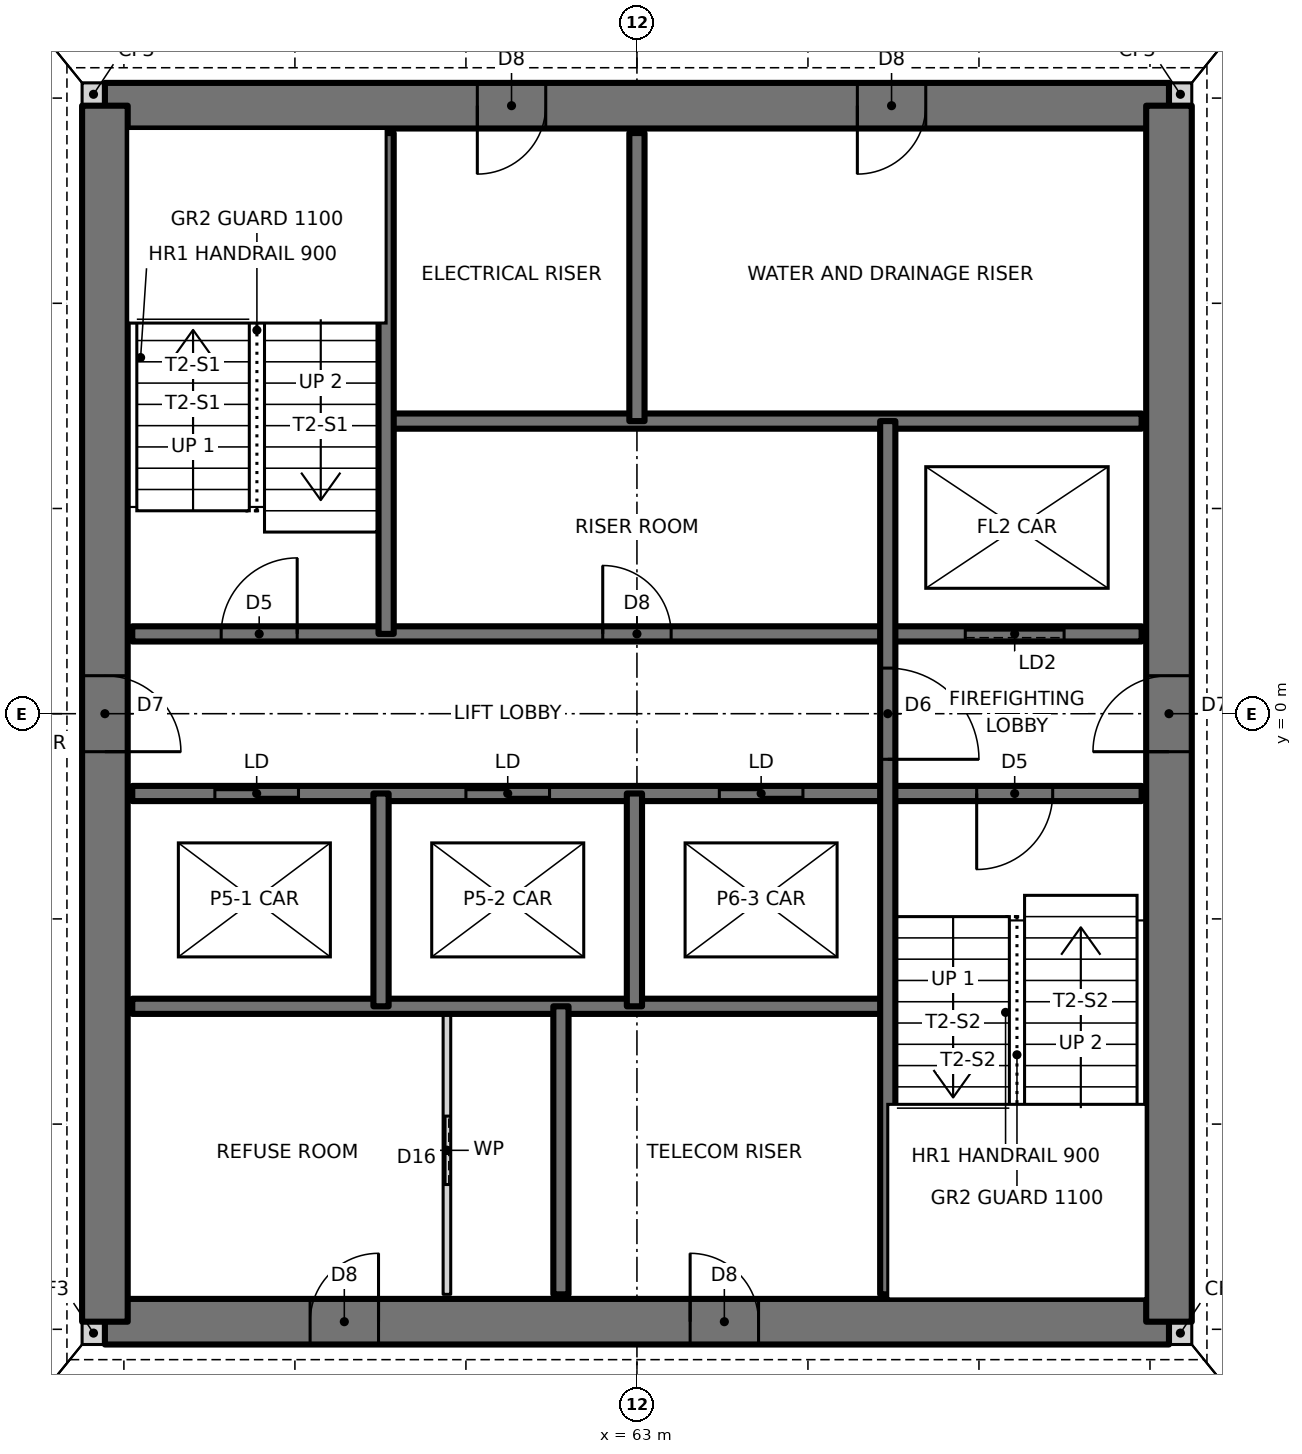
"""IFC4 building model, lengths in metres.
Left out: names, types, materials, properties, quantities, classifications, styles, units other than length and angle.
Written with IfcOpenShell. Run it as: python <this file> out.ifc"""

import sys

from ifc_helpers import new_model, si_unit, direction, frame, frame_2d, origin, place, context, subcontext, project, spatial, rectangle, extrude, element, fill, save


model = new_model("IFC4")
c1 = context("Model", 3, precision=1e-05, world=origin(), true_north=direction((0.0, 1.0)))
c2 = subcontext(c1, "Body", "Model", "MODEL_VIEW")
j1 = project(units=[si_unit("LENGTHUNIT", "METRE"), si_unit("PLANEANGLEUNIT", "RADIAN")], contexts=[c1])
p1 = place(None, origin())
s1 = spatial("IfcSite", under=j1, at=p1, CompositionType="ELEMENT")
p2 = place(p1, origin())
s2 = spatial("IfcBuilding", under=s1, at=p2, CompositionType="ELEMENT")
p3 = place(p2, frame((0.0, 0.0, 98.0)))
s3 = spatial("IfcBuildingStorey", under=s2, at=p3, CompositionType="ELEMENT", Elevation=98.0)
for number, where, z_axis, x_axis in (
    (1, (55.7, -8.15, 0.0), (0.0, 0.0, 1.0), (1.0, 0.0, 0.0)),
    (2, (70.0, -8.15, 0.0), (0.0, 0.0, 1.0), (1.0, 0.0, 0.0)),
    (3, (70.0, 8.15, 0.0), (0.0, 0.0, 1.0), (1.0, 0.0, 0.0)),
    (4, (55.7, 8.15, 0.0), (0.0, 0.0, 1.0), (1.0, 0.0, 0.0)),
):
    element("IfcWall", number, at=place(p3, frame(where, z_axis=z_axis, x_axis=x_axis)), inside=s3, PredefinedType="SOLIDWALL", context=c2, shape_type="SweptSolid", body=[
        extrude(rectangle(XDim=0.3, YDim=0.3, at=frame_2d((0.15, 0.0))), origin(), (0.0, 0.0, 1.0), 3.5),
    ])
p4 = place(p3, frame((56.0, -8.0, 0.0), z_axis=(0.0, 0.0, 1.0), x_axis=(1.0, 0.0, 0.0)))
e5 = element("IfcWall", 5, at=p4, inside=s3, PredefinedType="SHEAR", context=c2, shape_type="SweptSolid", body=[
    extrude(rectangle(XDim=14.0, YDim=0.6, at=frame_2d((7.0, 0.0))), origin(), (0.0, 0.0, 1.0), 3.5),
])
p5 = place(p4, frame((2.7, 0.0, 0.0)))
e6 = element("IfcOpeningElement", 6, at=p5, cuts=e5, PredefinedType="OPENING", context=c2, shape_type="SweptSolid", body=[
    extrude(rectangle(XDim=0.9, YDim=2.1, at=frame_2d((0.45, 1.05))), frame((0.0, 0.31, 0.0), z_axis=(0.0, -1.0, 0.0), x_axis=(1.0, 0.0, 0.0)), (0.0, 0.0, 1.0), 0.62),
])
p6 = place(p4, frame((7.7, 0.0, 0.0)))
e7 = element("IfcOpeningElement", 7, at=p6, cuts=e5, PredefinedType="OPENING", context=c2, shape_type="SweptSolid", body=[
    extrude(rectangle(XDim=0.9, YDim=2.1, at=frame_2d((0.45, 1.05))), frame((0.0, 0.31, 0.0), z_axis=(0.0, -1.0, 0.0), x_axis=(1.0, 0.0, 0.0)), (0.0, 0.0, 1.0), 0.62),
])
p7 = place(p3, frame((70.0, 8.0, 0.0), z_axis=(0.0, 0.0, 1.0), x_axis=(-1.0, 0.0, 0.0)))
e8 = element("IfcWall", 8, at=p7, inside=s3, PredefinedType="SHEAR", context=c2, shape_type="SweptSolid", body=[
    extrude(rectangle(XDim=14.0, YDim=0.6, at=frame_2d((7.0, 0.0))), origin(), (0.0, 0.0, 1.0), 3.5),
])
p8 = place(p7, frame((8.2, 0.0, 0.0)))
e9 = element("IfcOpeningElement", 9, at=p8, cuts=e8, PredefinedType="OPENING", context=c2, shape_type="SweptSolid", body=[
    extrude(rectangle(XDim=0.9, YDim=2.1, at=frame_2d((0.45, 1.05))), frame((0.0, 0.31, 0.0), z_axis=(0.0, -1.0, 0.0), x_axis=(1.0, 0.0, 0.0)), (0.0, 0.0, 1.0), 0.62),
])
p9 = place(p7, frame((3.2, 0.0, 0.0)))
e10 = element("IfcOpeningElement", 10, at=p9, cuts=e8, PredefinedType="OPENING", context=c2, shape_type="SweptSolid", body=[
    extrude(rectangle(XDim=0.9, YDim=2.1, at=frame_2d((0.45, 1.05))), frame((0.0, 0.31, 0.0), z_axis=(0.0, -1.0, 0.0), x_axis=(1.0, 0.0, 0.0)), (0.0, 0.0, 1.0), 0.62),
])
p10 = place(p3, frame((70.0, -8.0, 0.0), z_axis=(0.0, 0.0, 1.0), x_axis=(0.0, 1.0, 0.0)))
e11 = element("IfcWall", 11, at=p10, inside=s3, PredefinedType="SHEAR", context=c2, shape_type="SweptSolid", body=[
    extrude(rectangle(XDim=16.0, YDim=0.6, at=frame_2d((8.0, 0.0))), origin(), (0.0, 0.0, 1.0), 3.5),
])
p11 = place(p10, frame((7.5, 0.0, 0.0)))
e12 = element("IfcOpeningElement", 12, at=p11, cuts=e11, PredefinedType="OPENING", context=c2, shape_type="SweptSolid", body=[
    extrude(rectangle(XDim=1.0, YDim=2.1, at=frame_2d((0.5, 1.05))), frame((0.0, 0.31, 0.0), z_axis=(0.0, -1.0, 0.0), x_axis=(1.0, 0.0, 0.0)), (0.0, 0.0, 1.0), 0.62),
])
p12 = place(p3, frame((56.0, 8.0, 0.0), z_axis=(0.0, 0.0, 1.0), x_axis=(0.0, -1.0, 0.0)))
e13 = element("IfcWall", 13, at=p12, inside=s3, PredefinedType="SHEAR", context=c2, shape_type="SweptSolid", body=[
    extrude(rectangle(XDim=16.0, YDim=0.6, at=frame_2d((8.0, 0.0))), origin(), (0.0, 0.0, 1.0), 3.5),
])
p13 = place(p12, frame((7.5, 0.0, 0.0)))
e14 = element("IfcOpeningElement", 14, at=p13, cuts=e13, PredefinedType="OPENING", context=c2, shape_type="SweptSolid", body=[
    extrude(rectangle(XDim=1.0, YDim=2.1, at=frame_2d((0.5, 1.05))), frame((0.0, 0.31, 0.0), z_axis=(0.0, -1.0, 0.0), x_axis=(1.0, 0.0, 0.0)), (0.0, 0.0, 1.0), 0.62),
])
p14 = place(p3, frame((56.36, -3.85, 0.0), z_axis=(0.0, 0.0, 1.0), x_axis=(1.0, 0.0, 0.0)))
e15 = element("IfcWall", 15, at=p14, inside=s3, PredefinedType="SOLIDWALL", context=c2, shape_type="SweptSolid", body=[
    extrude(rectangle(XDim=9.94, YDim=0.2, at=frame_2d((4.97, 0.0))), origin(), (0.0, 0.0, 1.0), 3.5),
])
p15 = place(p3, frame((56.36, -1.05, 0.0), z_axis=(0.0, 0.0, 1.0), x_axis=(1.0, 0.0, 0.0)))
e16 = element("IfcWall", 16, at=p15, inside=s3, PredefinedType="SOLIDWALL", context=c2, shape_type="SweptSolid", body=[
    extrude(rectangle(XDim=13.28, YDim=0.2, at=frame_2d((6.64, 0.0))), origin(), (0.0, 0.0, 1.0), 3.5),
])
p16 = place(p15, frame((11.11, 0.0, 0.0)))
e17 = element("IfcOpeningElement", 17, at=p16, cuts=e16, PredefinedType="OPENING", context=c2, shape_type="SweptSolid", body=[
    extrude(rectangle(XDim=1.0, YDim=2.1, at=frame_2d((0.5, 1.05))), frame((0.0, 0.11, 0.0), z_axis=(0.0, -1.0, 0.0), x_axis=(1.0, 0.0, 0.0)), (0.0, 0.0, 1.0), 0.22),
])
p17 = place(p15, frame((1.087, 0.0, 0.0)))
e18 = element("IfcOpeningElement", 18, at=p17, cuts=e16, PredefinedType="OPENING", context=c2, shape_type="SweptSolid", body=[
    extrude(rectangle(XDim=1.1, YDim=2.1, at=frame_2d((0.55, 1.05))), frame((0.0, 0.11, 0.0), z_axis=(0.0, -1.0, 0.0), x_axis=(1.0, 0.0, 0.0)), (0.0, 0.0, 1.0), 0.22),
])
p18 = place(p15, frame((4.39, 0.0, 0.0)))
e19 = element("IfcOpeningElement", 19, at=p18, cuts=e16, PredefinedType="OPENING", context=c2, shape_type="SweptSolid", body=[
    extrude(rectangle(XDim=1.1, YDim=2.1, at=frame_2d((0.55, 1.05))), frame((0.0, 0.11, 0.0), z_axis=(0.0, -1.0, 0.0), x_axis=(1.0, 0.0, 0.0)), (0.0, 0.0, 1.0), 0.22),
])
p19 = place(p15, frame((7.724, 0.0, 0.0)))
e20 = element("IfcOpeningElement", 20, at=p19, cuts=e16, PredefinedType="OPENING", context=c2, shape_type="SweptSolid", body=[
    extrude(rectangle(XDim=1.1, YDim=2.1, at=frame_2d((0.55, 1.05))), frame((0.0, 0.11, 0.0), z_axis=(0.0, -1.0, 0.0), x_axis=(1.0, 0.0, 0.0)), (0.0, 0.0, 1.0), 0.22),
])
p20 = place(p3, frame((56.36, 1.05, 0.0), z_axis=(0.0, 0.0, 1.0), x_axis=(1.0, 0.0, 0.0)))
e21 = element("IfcWall", 21, at=p20, inside=s3, PredefinedType="SOLIDWALL", context=c2, shape_type="SweptSolid", body=[
    extrude(rectangle(XDim=13.28, YDim=0.2, at=frame_2d((6.64, 0.0))), origin(), (0.0, 0.0, 1.0), 3.5),
])
p21 = place(p20, frame((1.17, 0.0, 0.0)))
e22 = element("IfcOpeningElement", 22, at=p21, cuts=e21, PredefinedType="OPENING", context=c2, shape_type="SweptSolid", body=[
    extrude(rectangle(XDim=1.0, YDim=2.1, at=frame_2d((0.5, 1.05))), frame((0.0, 0.11, 0.0), z_axis=(0.0, -1.0, 0.0), x_axis=(1.0, 0.0, 0.0)), (0.0, 0.0, 1.0), 0.22),
])
p22 = place(p20, frame((6.19, 0.0, 0.0)))
e23 = element("IfcOpeningElement", 23, at=p22, cuts=e21, PredefinedType="OPENING", context=c2, shape_type="SweptSolid", body=[
    extrude(rectangle(XDim=0.9, YDim=2.1, at=frame_2d((0.45, 1.05))), frame((0.0, 0.11, 0.0), z_axis=(0.0, -1.0, 0.0), x_axis=(1.0, 0.0, 0.0)), (0.0, 0.0, 1.0), 0.22),
])
p23 = place(p20, frame((10.96, 0.0, 0.0)))
e24 = element("IfcOpeningElement", 24, at=p23, cuts=e21, PredefinedType="OPENING", context=c2, shape_type="SweptSolid", body=[
    extrude(rectangle(XDim=1.3, YDim=2.1, at=frame_2d((0.65, 1.05))), frame((0.0, 0.11, 0.0), z_axis=(0.0, -1.0, 0.0), x_axis=(1.0, 0.0, 0.0)), (0.0, 0.0, 1.0), 0.22),
])
p24 = place(p3, frame((59.7, 3.85, 0.0), z_axis=(0.0, 0.0, 1.0), x_axis=(1.0, 0.0, 0.0)))
e25 = element("IfcWall", 25, at=p24, inside=s3, PredefinedType="SOLIDWALL", context=c2, shape_type="SweptSolid", body=[
    extrude(rectangle(XDim=9.94, YDim=0.2, at=frame_2d((4.97, 0.0))), origin(), (0.0, 0.0, 1.0), 3.5),
])
p25 = place(p3, frame((66.3, -7.64, 0.0), z_axis=(0.0, 0.0, 1.0), x_axis=(0.0, 1.0, 0.0)))
e26 = element("IfcWall", 26, at=p25, inside=s3, PredefinedType="SOLIDWALL", context=c2, shape_type="SweptSolid", body=[
    extrude(rectangle(XDim=11.49, YDim=0.2, at=frame_2d((5.745, 0.0))), origin(), (0.0, 0.0, 1.0), 3.5),
])
p26 = place(p25, frame((7.04, 0.0, 0.0)))
e27 = element("IfcOpeningElement", 27, at=p26, cuts=e26, PredefinedType="OPENING", context=c2, shape_type="SweptSolid", body=[
    extrude(rectangle(XDim=1.2, YDim=2.1, at=frame_2d((0.6, 1.05))), frame((0.0, 0.11, 0.0), z_axis=(0.0, -1.0, 0.0), x_axis=(1.0, 0.0, 0.0)), (0.0, 0.0, 1.0), 0.22),
])
p27 = place(p3, frame((63.0, 3.85, 0.0), z_axis=(0.0, 0.0, 1.0), x_axis=(0.0, 1.0, 0.0)))
e28 = element("IfcWall", 28, at=p27, inside=s3, PredefinedType="SOLIDWALL", context=c2, shape_type="SweptSolid", body=[
    extrude(rectangle(XDim=3.79, YDim=0.2, at=frame_2d((1.895, 0.0))), origin(), (0.0, 0.0, 1.0), 3.5),
])
p28 = place(p3, frame((62.967, -3.85, 0.0), z_axis=(0.0, 0.0, 1.0), x_axis=(0.0, 1.0, 0.0)))
e29 = element("IfcWall", 29, at=p28, inside=s3, PredefinedType="SOLIDWALL", context=c2, shape_type="SweptSolid", body=[
    extrude(rectangle(XDim=2.8, YDim=0.2, at=frame_2d((1.4, 0.0))), origin(), (0.0, 0.0, 1.0), 3.5),
])
p29 = place(p3, frame((62.0, -7.64, 0.0), z_axis=(0.0, 0.0, 1.0), x_axis=(0.0, 1.0, 0.0)))
e30 = element("IfcWall", 30, at=p29, inside=s3, PredefinedType="SOLIDWALL", context=c2, shape_type="SweptSolid", body=[
    extrude(rectangle(XDim=3.79, YDim=0.2, at=frame_2d((1.895, 0.0))), origin(), (0.0, 0.0, 1.0), 3.5),
])
p30 = place(p3, frame((60.5, -7.64, 0.0), z_axis=(0.0, 0.0, 1.0), x_axis=(0.0, 1.0, 0.0)))
e31 = element("IfcWall", 31, at=p30, inside=s3, PredefinedType="PARTITIONING", context=c2, shape_type="SweptSolid", body=[
    extrude(rectangle(XDim=3.79, YDim=0.1, at=frame_2d((1.895, 0.0))), origin(), (0.0, 0.0, 1.0), 3.3),
])
p31 = place(p30, frame((1.445, 0.0, 0.0)))
e32 = element("IfcOpeningElement", 32, at=p31, cuts=e31, PredefinedType="OPENING", context=c2, shape_type="SweptSolid", body=[
    extrude(rectangle(XDim=0.9, YDim=2.1, at=frame_2d((0.45, 1.05))), frame((0.0, 0.06, 0.0), z_axis=(0.0, -1.0, 0.0), x_axis=(1.0, 0.0, 0.0)), (0.0, 0.0, 1.0), 0.12),
])
p32 = place(p3, frame((59.7, 1.05, 0.0), z_axis=(0.0, 0.0, 1.0), x_axis=(0.0, 1.0, 0.0)))
e33 = element("IfcWall", 33, at=p32, inside=s3, PredefinedType="SOLIDWALL", context=c2, shape_type="SweptSolid", body=[
    extrude(rectangle(XDim=6.59, YDim=0.2, at=frame_2d((3.295, 0.0))), origin(), (0.0, 0.0, 1.0), 3.5),
])
p33 = place(p3, frame((59.633, -3.85, 0.0), z_axis=(0.0, 0.0, 1.0), x_axis=(0.0, 1.0, 0.0)))
e34 = element("IfcWall", 34, at=p33, inside=s3, PredefinedType="SOLIDWALL", context=c2, shape_type="SweptSolid", body=[
    extrude(rectangle(XDim=2.8, YDim=0.2, at=frame_2d((1.4, 0.0))), origin(), (0.0, 0.0, 1.0), 3.5),
])
p34 = place(p21, origin())
e35 = element("IfcDoor", 35, at=p34, inside=s3, OperationType="SINGLE_SWING_RIGHT", PredefinedType="DOOR", context=c2, shape_type="SweptSolid", body=[
    extrude(rectangle(XDim=1.0, YDim=2.1, at=frame_2d((0.5, 1.05))), frame((0.0, 0.025, 0.0), z_axis=(0.0, -1.0, 0.0), x_axis=(1.0, 0.0, 0.0)), (0.0, 0.0, 1.0), 0.05),
])
fill(e22, e35)
p35 = place(p16, frame((1.0, 0.0, 0.0), z_axis=(0.0, 0.0, 1.0), x_axis=(-1.0, 0.0, 0.0)))
e36 = element("IfcDoor", 36, at=p35, inside=s3, OperationType="SINGLE_SWING_RIGHT", PredefinedType="DOOR", context=c2, shape_type="SweptSolid", body=[
    extrude(rectangle(XDim=1.0, YDim=2.1, at=frame_2d((0.5, 1.05))), frame((0.0, 0.025, 0.0), z_axis=(0.0, -1.0, 0.0), x_axis=(1.0, 0.0, 0.0)), (0.0, 0.0, 1.0), 0.05),
])
fill(e17, e36)
p36 = place(p26, frame((1.2, 0.0, 0.0), z_axis=(0.0, 0.0, 1.0), x_axis=(-1.0, 0.0, 0.0)))
e37 = element("IfcDoor", 37, at=p36, inside=s3, OperationType="SINGLE_SWING_RIGHT", PredefinedType="DOOR", context=c2, shape_type="SweptSolid", body=[
    extrude(rectangle(XDim=1.2, YDim=2.1, at=frame_2d((0.6, 1.05))), frame((0.0, 0.025, 0.0), z_axis=(0.0, -1.0, 0.0), x_axis=(1.0, 0.0, 0.0)), (0.0, 0.0, 1.0), 0.05),
])
fill(e27, e37)
p37 = place(p22, origin())
e38 = element("IfcDoor", 38, at=p37, inside=s3, OperationType="SINGLE_SWING_LEFT", PredefinedType="DOOR", context=c2, shape_type="SweptSolid", body=[
    extrude(rectangle(XDim=0.9, YDim=2.1, at=frame_2d((0.45, 1.05))), frame((0.0, 0.025, 0.0), z_axis=(0.0, -1.0, 0.0), x_axis=(1.0, 0.0, 0.0)), (0.0, 0.0, 1.0), 0.05),
])
fill(e23, e38)
p38 = place(p31, origin())
e39 = element("IfcDoor", 39, at=p38, inside=s3, OperationType="SLIDING_TO_LEFT", PredefinedType="DOOR", context=c2, shape_type="SweptSolid", body=[
    extrude(rectangle(XDim=0.9, YDim=2.1, at=frame_2d((0.45, 1.05))), frame((0.0, 0.025, 0.0), z_axis=(0.0, -1.0, 0.0), x_axis=(1.0, 0.0, 0.0)), (0.0, 0.0, 1.0), 0.05),
])
fill(e32, e39)
p39 = place(p13, origin())
e40 = element("IfcDoor", 40, at=p39, inside=s3, OperationType="SINGLE_SWING_RIGHT", PredefinedType="DOOR", context=c2, shape_type="SweptSolid", body=[
    extrude(rectangle(XDim=1.0, YDim=2.1, at=frame_2d((0.5, 1.05))), frame((0.0, 0.025, 0.0), z_axis=(0.0, -1.0, 0.0), x_axis=(1.0, 0.0, 0.0)), (0.0, 0.0, 1.0), 0.05),
])
fill(e14, e40)
p40 = place(p11, origin())
e41 = element("IfcDoor", 41, at=p40, inside=s3, OperationType="SINGLE_SWING_LEFT", PredefinedType="DOOR", context=c2, shape_type="SweptSolid", body=[
    extrude(rectangle(XDim=1.0, YDim=2.1, at=frame_2d((0.5, 1.05))), frame((0.0, 0.025, 0.0), z_axis=(0.0, -1.0, 0.0), x_axis=(1.0, 0.0, 0.0)), (0.0, 0.0, 1.0), 0.05),
])
fill(e12, e41)
p41 = place(p8, origin())
e42 = element("IfcDoor", 42, at=p41, inside=s3, OperationType="SINGLE_SWING_RIGHT", PredefinedType="DOOR", context=c2, shape_type="SweptSolid", body=[
    extrude(rectangle(XDim=0.9, YDim=2.1, at=frame_2d((0.45, 1.05))), frame((0.0, 0.025, 0.0), z_axis=(0.0, -1.0, 0.0), x_axis=(1.0, 0.0, 0.0)), (0.0, 0.0, 1.0), 0.05),
])
fill(e9, e42)
p42 = place(p9, origin())
e43 = element("IfcDoor", 43, at=p42, inside=s3, OperationType="SINGLE_SWING_RIGHT", PredefinedType="DOOR", context=c2, shape_type="SweptSolid", body=[
    extrude(rectangle(XDim=0.9, YDim=2.1, at=frame_2d((0.45, 1.05))), frame((0.0, 0.025, 0.0), z_axis=(0.0, -1.0, 0.0), x_axis=(1.0, 0.0, 0.0)), (0.0, 0.0, 1.0), 0.05),
])
fill(e10, e43)
p43 = place(p5, origin())
e44 = element("IfcDoor", 44, at=p43, inside=s3, OperationType="SINGLE_SWING_RIGHT", PredefinedType="DOOR", context=c2, shape_type="SweptSolid", body=[
    extrude(rectangle(XDim=0.9, YDim=2.1, at=frame_2d((0.45, 1.05))), frame((0.0, 0.025, 0.0), z_axis=(0.0, -1.0, 0.0), x_axis=(1.0, 0.0, 0.0)), (0.0, 0.0, 1.0), 0.05),
])
fill(e6, e44)
p44 = place(p6, origin())
e45 = element("IfcDoor", 45, at=p44, inside=s3, OperationType="SINGLE_SWING_LEFT", PredefinedType="DOOR", context=c2, shape_type="SweptSolid", body=[
    extrude(rectangle(XDim=0.9, YDim=2.1, at=frame_2d((0.45, 1.05))), frame((0.0, 0.025, 0.0), z_axis=(0.0, -1.0, 0.0), x_axis=(1.0, 0.0, 0.0)), (0.0, 0.0, 1.0), 0.05),
])
fill(e7, e45)
p45 = place(p17, origin())
e46 = element("IfcDoor", 46, at=p45, inside=s3, OperationType="DOUBLE_DOOR_SLIDING", PredefinedType="DOOR", context=c2, shape_type="SweptSolid", body=[
    extrude(rectangle(XDim=1.1, YDim=2.1, at=frame_2d((0.55, 1.05))), frame((0.0, 0.025, 0.0), z_axis=(0.0, -1.0, 0.0), x_axis=(1.0, 0.0, 0.0)), (0.0, 0.0, 1.0), 0.05),
])
fill(e18, e46)
p46 = place(p18, origin())
e47 = element("IfcDoor", 47, at=p46, inside=s3, OperationType="DOUBLE_DOOR_SLIDING", PredefinedType="DOOR", context=c2, shape_type="SweptSolid", body=[
    extrude(rectangle(XDim=1.1, YDim=2.1, at=frame_2d((0.55, 1.05))), frame((0.0, 0.025, 0.0), z_axis=(0.0, -1.0, 0.0), x_axis=(1.0, 0.0, 0.0)), (0.0, 0.0, 1.0), 0.05),
])
fill(e19, e47)
p47 = place(p19, origin())
e48 = element("IfcDoor", 48, at=p47, inside=s3, OperationType="DOUBLE_DOOR_SLIDING", PredefinedType="DOOR", context=c2, shape_type="SweptSolid", body=[
    extrude(rectangle(XDim=1.1, YDim=2.1, at=frame_2d((0.55, 1.05))), frame((0.0, 0.025, 0.0), z_axis=(0.0, -1.0, 0.0), x_axis=(1.0, 0.0, 0.0)), (0.0, 0.0, 1.0), 0.05),
])
fill(e20, e48)
p48 = place(p23, origin())
e49 = element("IfcDoor", 49, at=p48, inside=s3, OperationType="SLIDING_TO_LEFT", PredefinedType="DOOR", context=c2, shape_type="SweptSolid", body=[
    extrude(rectangle(XDim=1.3, YDim=2.1, at=frame_2d((0.65, 1.05))), frame((0.0, 0.025, 0.0), z_axis=(0.0, -1.0, 0.0), x_axis=(1.0, 0.0, 0.0)), (0.0, 0.0, 1.0), 0.05),
])
fill(e24, e49)
save(model, sys.argv[1])
